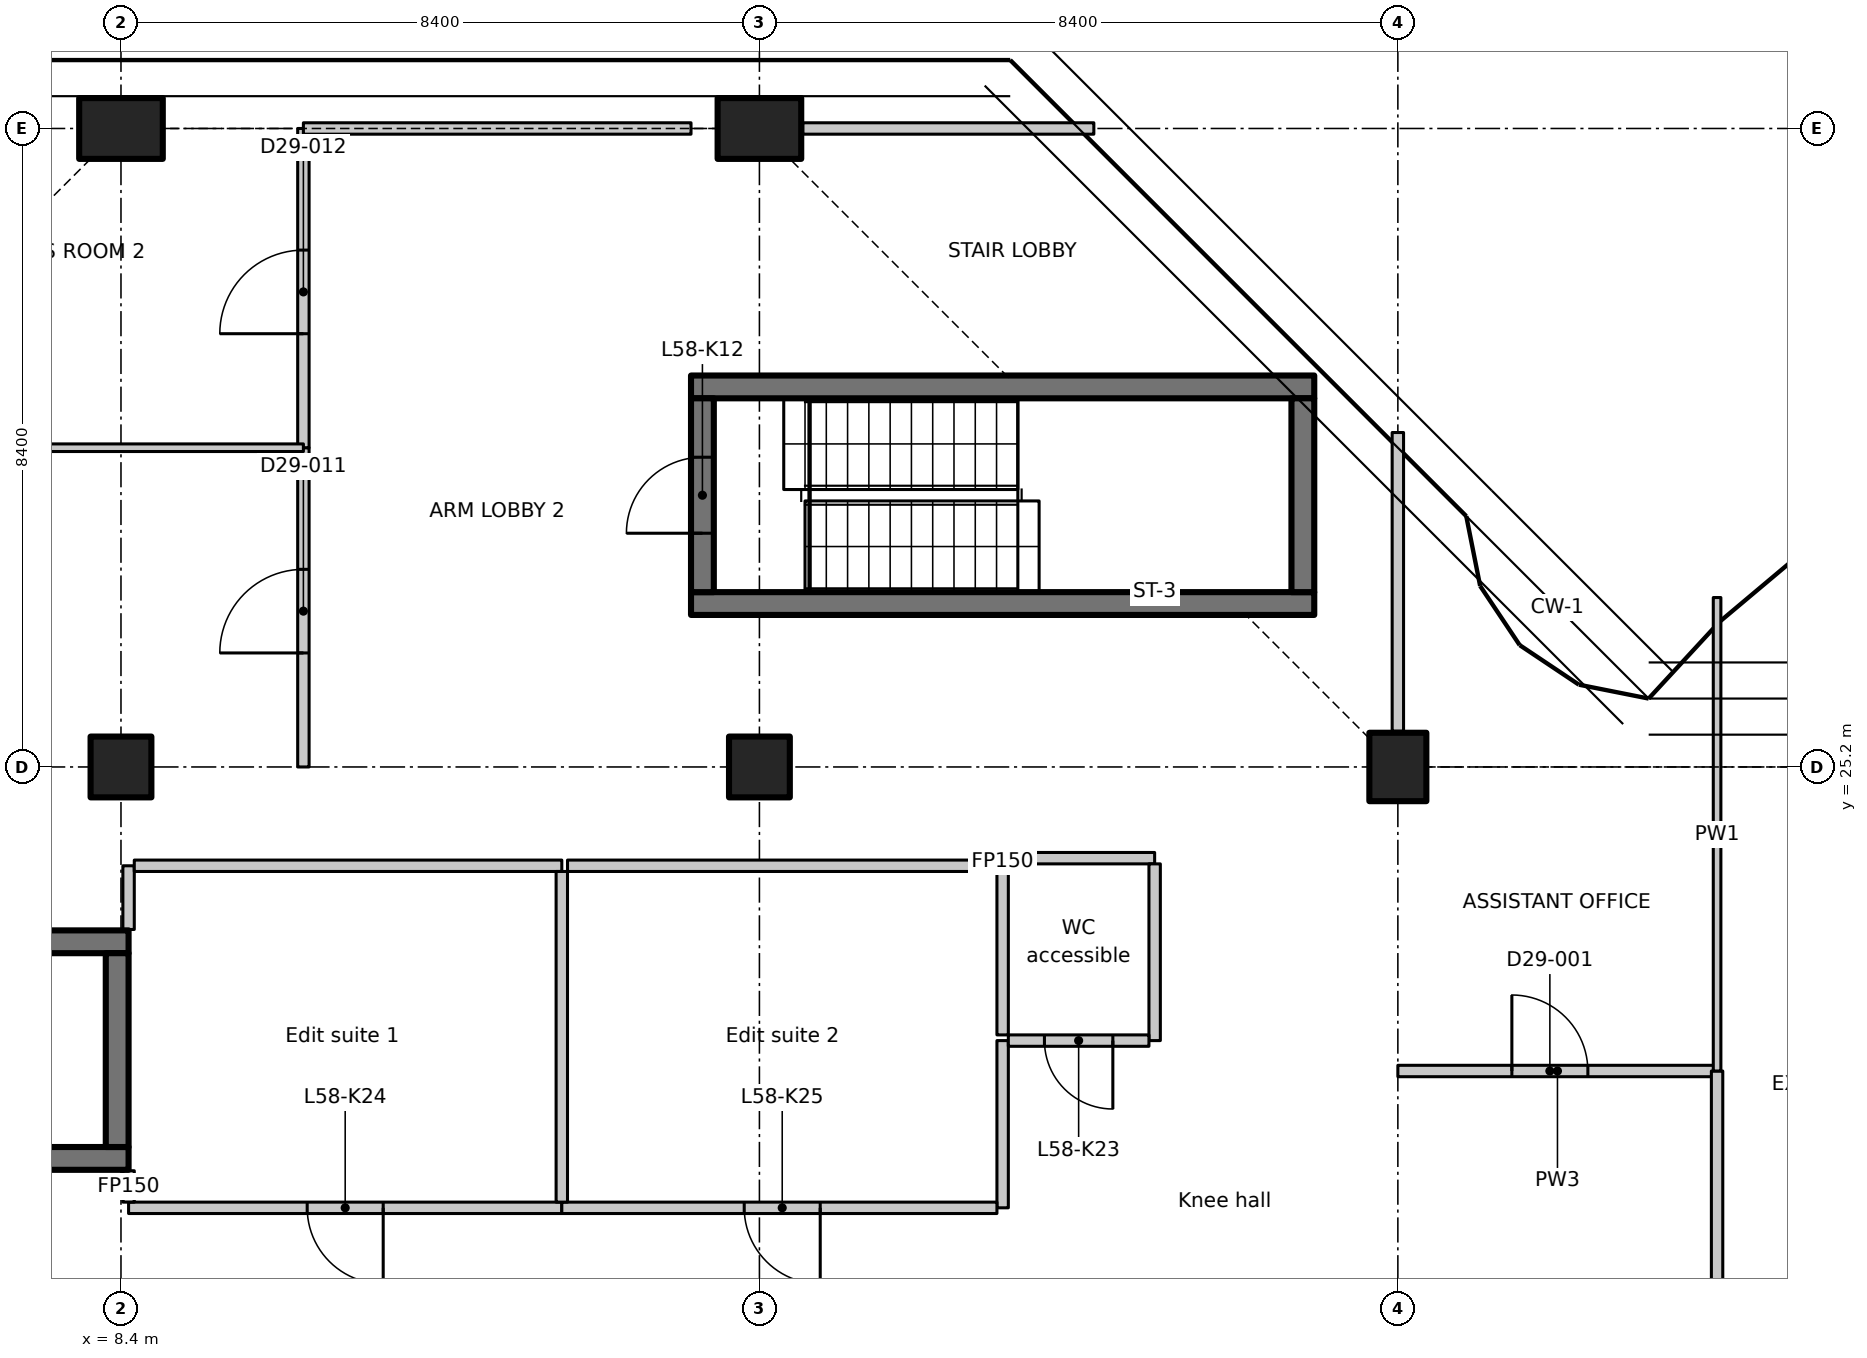
"""IFC4 building model, lengths in metres.
Left out: names, types, materials, properties, quantities, classifications, styles, units other than length and angle.
Written with IfcOpenShell. Run it as: python <this file> out.ifc"""

import sys

from ifc_helpers import new_model, si_unit, direction, frame, frame_2d, origin, origin_2d, place, context, subcontext, project, spatial, polyline, rectangle, outline, extrude, element, fill, save


model = new_model("IFC4")
c1 = context("Model", 3, precision=1e-05, world=origin(), true_north=direction((0.0, 1.0)))
c2 = subcontext(c1, "Body", "Model", "MODEL_VIEW")
j1 = project(units=[si_unit("LENGTHUNIT", "METRE"), si_unit("PLANEANGLEUNIT", "RADIAN")], contexts=[c1])
p1 = place(None, origin())
s1 = spatial("IfcSite", under=j1, at=p1, CompositionType="ELEMENT")
p2 = place(p1, origin())
s2 = spatial("IfcBuilding", under=s1, at=p2, CompositionType="ELEMENT")
p3 = place(p2, frame((0.0, 0.0, 230.1)))
s3 = spatial("IfcBuildingStorey", under=s2, at=p3, CompositionType="ELEMENT", Elevation=230.1)
p4 = place(p3, frame((8.4, 25.2, 0.0), z_axis=(0.0, 0.0, 1.0), x_axis=(1.0, 0.0, 0.0)))
e1 = element("IfcColumn", 1, at=p4, inside=s3, PredefinedType="COLUMN", context=c2, shape_type="SweptSolid", body=[
    extrude(rectangle(XDim=0.8, YDim=0.8, at=origin_2d()), origin(), (0.0, 0.0, 1.0), 3.35),
])
p5 = place(p3, frame((8.4, 33.6, 0.0), z_axis=(0.0, 0.0, 1.0), x_axis=(0.0, 1.0, 0.0)))
e2 = element("IfcColumn", 2, at=p5, inside=s3, PredefinedType="COLUMN", context=c2, shape_type="SweptSolid", body=[
    extrude(rectangle(XDim=0.8, YDim=1.1, at=origin_2d()), origin(), (0.0, 0.0, 1.0), 3.35),
])
p6 = place(p3, frame((16.8, 25.2, 0.0), z_axis=(0.0, 0.0, 1.0), x_axis=(1.0, 0.0, 0.0)))
e3 = element("IfcColumn", 3, at=p6, inside=s3, PredefinedType="COLUMN", context=c2, shape_type="SweptSolid", body=[
    extrude(rectangle(XDim=0.8, YDim=0.8, at=origin_2d()), origin(), (0.0, 0.0, 1.0), 3.35),
])
p7 = place(p3, frame((16.8, 33.6, 0.0), z_axis=(0.0, 0.0, 1.0), x_axis=(0.0, 1.0, 0.0)))
e4 = element("IfcColumn", 4, at=p7, inside=s3, PredefinedType="COLUMN", context=c2, shape_type="SweptSolid", body=[
    extrude(rectangle(XDim=0.8, YDim=1.1, at=origin_2d()), origin(), (0.0, 0.0, 1.0), 3.35),
])
p8 = place(p3, frame((25.2, 25.2, 0.0), z_axis=(0.0, 0.0, 1.0), x_axis=(1.0, 0.0, 0.0)))
e5 = element("IfcColumn", 5, at=p8, inside=s3, PredefinedType="COLUMN", context=c2, shape_type="SweptSolid", body=[
    extrude(rectangle(XDim=0.75, YDim=0.9, at=origin_2d()), origin(), (0.0, 0.0, 1.0), 3.35),
])
p9 = place(p3, frame((8.5, 20.05, 0.0), z_axis=(0.0, 0.0, 1.0), x_axis=(-1.0, 0.0, 0.0)))
e6 = element("IfcWall", 6, at=p9, inside=s3, PredefinedType="SHEAR", context=c2, shape_type="SweptSolid", body=[
    extrude(rectangle(XDim=8.2, YDim=0.3, at=frame_2d((4.1, 0.0))), origin(), (0.0, 0.0, 1.0), 3.35),
])
p10 = place(p9, frame((6.8, 0.0, 0.0)))
e7 = element("IfcOpeningElement", 7, at=p10, cuts=e6, PredefinedType="OPENING", context=c2, shape_type="SweptSolid", body=[
    extrude(rectangle(XDim=1.0, YDim=2.1, at=frame_2d((0.5, 1.05))), frame((0.0, 0.16, 0.0), z_axis=(0.0, -1.0, 0.0), x_axis=(1.0, 0.0, 0.0)), (0.0, 0.0, 1.0), 0.32),
])
p11 = place(p3, frame((0.3, 22.9, 0.0), z_axis=(0.0, 0.0, 1.0), x_axis=(1.0, 0.0, 0.0)))
e8 = element("IfcWall", 8, at=p11, inside=s3, PredefinedType="SHEAR", context=c2, shape_type="SweptSolid", body=[
    extrude(rectangle(XDim=8.2, YDim=0.3, at=frame_2d((4.1, 0.0))), origin(), (0.0, 0.0, 1.0), 3.35),
])
p12 = place(p11, frame((0.4, 0.0, 0.0)))
e9 = element("IfcOpeningElement", 9, at=p12, cuts=e8, PredefinedType="OPENING", context=c2, shape_type="SweptSolid", body=[
    extrude(rectangle(XDim=1.0, YDim=2.1, at=frame_2d((0.5, 1.05))), frame((0.0, 0.16, 0.0), z_axis=(0.0, -1.0, 0.0), x_axis=(1.0, 0.0, 0.0)), (0.0, 0.0, 1.0), 0.32),
])
p13 = place(p3, frame((8.35, 20.2, 0.0), z_axis=(0.0, 0.0, 1.0), x_axis=(0.0, 1.0, 0.0)))
e10 = element("IfcWall", 10, at=p13, inside=s3, PredefinedType="SHEAR", context=c2, shape_type="SweptSolid", body=[
    extrude(rectangle(XDim=2.55, YDim=0.3, at=frame_2d((1.275, 0.0))), origin(), (0.0, 0.0, 1.0), 3.35),
])
for number, where, z_axis, x_axis in (
    (11, (15.9, 27.35, 0.0), (0.0, 0.0, 1.0), (1.0, 0.0, 0.0)),
    (12, (15.9, 30.2, 0.0), (0.0, 0.0, 1.0), (1.0, 0.0, 0.0)),
):
    element("IfcWall", number, at=place(p3, frame(where, z_axis=z_axis, x_axis=x_axis)), inside=s3, PredefinedType="SHEAR", context=c2, shape_type="SweptSolid", body=[
        extrude(rectangle(XDim=8.2, YDim=0.3, at=frame_2d((4.1, 0.0))), origin(), (0.0, 0.0, 1.0), 3.35),
    ])
p14 = place(p3, frame((16.05, 27.5, 0.0), z_axis=(0.0, 0.0, 1.0), x_axis=(0.0, 1.0, 0.0)))
e13 = element("IfcWall", 13, at=p14, inside=s3, PredefinedType="SHEAR", context=c2, shape_type="SweptSolid", body=[
    extrude(rectangle(XDim=2.55, YDim=0.3, at=frame_2d((1.275, 0.0))), origin(), (0.0, 0.0, 1.0), 3.35),
])
p15 = place(p14, frame((0.775, 0.0, 0.0)))
e14 = element("IfcOpeningElement", 14, at=p15, cuts=e13, PredefinedType="OPENING", context=c2, shape_type="SweptSolid", body=[
    extrude(rectangle(XDim=1.0, YDim=2.1, at=frame_2d((0.5, 1.05))), frame((0.0, 0.16, 0.0), z_axis=(0.0, -1.0, 0.0), x_axis=(1.0, 0.0, 0.0)), (0.0, 0.0, 1.0), 0.32),
])
p16 = place(p3, frame((23.95, 27.5, 0.0), z_axis=(0.0, 0.0, 1.0), x_axis=(0.0, 1.0, 0.0)))
e15 = element("IfcWall", 15, at=p16, inside=s3, PredefinedType="SHEAR", context=c2, shape_type="SweptSolid", body=[
    extrude(rectangle(XDim=2.55, YDim=0.3, at=frame_2d((1.275, 0.0))), origin(), (0.0, 0.0, 1.0), 3.35),
])
p17 = place(p3, frame((14.2, 19.4, 0.0), z_axis=(0.0, 0.0, 1.0), x_axis=(-1.0, 0.0, 0.0)))
e16 = element("IfcWall", 16, at=p17, inside=s3, PredefinedType="PARTITIONING", context=c2, shape_type="SweptSolid", body=[
    extrude(rectangle(XDim=5.7, YDim=0.15, at=frame_2d((2.85, 0.0))), origin(), (0.0, 0.0, 1.0), 3.35),
])
p18 = place(p17, frame((2.35, 0.0, 0.0)))
e17 = element("IfcOpeningElement", 17, at=p18, cuts=e16, PredefinedType="OPENING", context=c2, shape_type="SweptSolid", body=[
    extrude(rectangle(XDim=1.0, YDim=2.1, at=frame_2d((0.5, 1.05))), frame((0.0, 0.085, 0.0), z_axis=(0.0, -1.0, 0.0), x_axis=(1.0, 0.0, 0.0)), (0.0, 0.0, 1.0), 0.17),
])
p19 = place(p3, frame((8.5, 19.475, 0.0), z_axis=(0.0, 0.0, 1.0), x_axis=(0.0, 1.0, 0.0)))
e18 = element("IfcWall", 18, at=p19, inside=s3, PredefinedType="PARTITIONING", context=c2, shape_type="SweptSolid", body=[
    extrude(rectangle(XDim=0.413, YDim=0.15, at=frame_2d((0.207, 0.0))), origin(), (0.0, 0.0, 1.0), 3.35),
])
p20 = place(p3, frame((8.5, 23.062, 0.0), z_axis=(0.0, 0.0, 1.0), x_axis=(0.0, 1.0, 0.0)))
e19 = element("IfcWall", 19, at=p20, inside=s3, PredefinedType="PARTITIONING", context=c2, shape_type="SweptSolid", body=[
    extrude(rectangle(XDim=0.838, YDim=0.15, at=frame_2d((0.419, 0.0))), origin(), (0.0, 0.0, 1.0), 3.35),
])
p21 = place(p3, frame((8.575, 23.9, 0.0), z_axis=(0.0, 0.0, 1.0), x_axis=(1.0, 0.0, 0.0)))
e20 = element("IfcWall", 20, at=p21, inside=s3, PredefinedType="PARTITIONING", context=c2, shape_type="SweptSolid", body=[
    extrude(rectangle(XDim=5.625, YDim=0.15, at=frame_2d((2.812, 0.0))), origin(), (0.0, 0.0, 1.0), 3.35),
])
p22 = place(p3, frame((20.0, 21.6, 0.0), z_axis=(0.0, 0.0, 1.0), x_axis=(0.0, -1.0, 0.0)))
e21 = element("IfcWall", 21, at=p22, inside=s3, PredefinedType="PARTITIONING", context=c2, shape_type="SweptSolid", body=[
    extrude(rectangle(XDim=2.2, YDim=0.15, at=frame_2d((1.1, 0.0))), origin(), (0.0, 0.0, 1.0), 3.35),
])
p23 = place(p3, frame((19.925, 19.4, 0.0), z_axis=(0.0, 0.0, 1.0), x_axis=(-1.0, 0.0, 0.0)))
e22 = element("IfcWall", 22, at=p23, inside=s3, PredefinedType="PARTITIONING", context=c2, shape_type="SweptSolid", body=[
    extrude(rectangle(XDim=5.725, YDim=0.15, at=frame_2d((2.863, 0.0))), origin(), (0.0, 0.0, 1.0), 3.35),
])
p24 = place(p23, frame((2.325, 0.0, 0.0)))
e23 = element("IfcOpeningElement", 23, at=p24, cuts=e22, PredefinedType="OPENING", context=c2, shape_type="SweptSolid", body=[
    extrude(rectangle(XDim=1.0, YDim=2.1, at=frame_2d((0.5, 1.05))), frame((0.0, 0.085, 0.0), z_axis=(0.0, -1.0, 0.0), x_axis=(1.0, 0.0, 0.0)), (0.0, 0.0, 1.0), 0.17),
])
p25 = place(p3, frame((14.2, 23.825, 0.0), z_axis=(0.0, 0.0, 1.0), x_axis=(0.0, -1.0, 0.0)))
e24 = element("IfcWall", 24, at=p25, inside=s3, PredefinedType="PARTITIONING", context=c2, shape_type="SweptSolid", body=[
    extrude(rectangle(XDim=4.35, YDim=0.15, at=frame_2d((2.175, 0.0))), origin(), (0.0, 0.0, 1.0), 3.35),
])
p26 = place(p3, frame((14.275, 23.9, 0.0), z_axis=(0.0, 0.0, 1.0), x_axis=(1.0, 0.0, 0.0)))
e25 = element("IfcWall", 25, at=p26, inside=s3, PredefinedType="PARTITIONING", context=c2, shape_type="SweptSolid", body=[
    extrude(rectangle(XDim=5.725, YDim=0.15, at=frame_2d((2.863, 0.0))), origin(), (0.0, 0.0, 1.0), 3.35),
])
p27 = place(p3, frame((20.0, 23.9, 0.0), z_axis=(0.0, 0.0, 1.0), x_axis=(0.0, 1.0, 0.0)))
e26 = element("IfcWall", 26, at=p27, inside=s3, PredefinedType="PARTITIONING", context=c2, shape_type="SweptSolid", body=[
    extrude(rectangle(XDim=0.1, YDim=0.15, at=frame_2d((0.05, 0.0))), origin(), (0.0, 0.0, 1.0), 3.35),
])
p28 = place(p3, frame((20.075, 24.0, 0.0), z_axis=(0.0, 0.0, 1.0), x_axis=(1.0, 0.0, 0.0)))
e27 = element("IfcWall", 27, at=p28, inside=s3, PredefinedType="PARTITIONING", context=c2, shape_type="SweptSolid", body=[
    extrude(rectangle(XDim=1.925, YDim=0.15, at=frame_2d((0.962, 0.0))), origin(), (0.0, 0.0, 1.0), 3.35),
])
p29 = place(p3, frame((22.0, 23.925, 0.0), z_axis=(0.0, 0.0, 1.0), x_axis=(0.0, -1.0, 0.0)))
e28 = element("IfcWall", 28, at=p29, inside=s3, PredefinedType="PARTITIONING", context=c2, shape_type="SweptSolid", body=[
    extrude(rectangle(XDim=2.325, YDim=0.15, at=frame_2d((1.163, 0.0))), origin(), (0.0, 0.0, 1.0), 3.35),
])
p30 = place(p3, frame((21.925, 21.6, 0.0), z_axis=(0.0, 0.0, 1.0), x_axis=(-1.0, 0.0, 0.0)))
e29 = element("IfcWall", 29, at=p30, inside=s3, PredefinedType="PARTITIONING", context=c2, shape_type="SweptSolid", body=[
    extrude(rectangle(XDim=1.85, YDim=0.15, at=frame_2d((0.925, 0.0))), origin(), (0.0, 0.0, 1.0), 3.35),
])
p31 = place(p30, frame((0.475, 0.0, 0.0)))
e30 = element("IfcOpeningElement", 30, at=p31, cuts=e29, PredefinedType="OPENING", context=c2, shape_type="SweptSolid", body=[
    extrude(rectangle(XDim=0.9, YDim=2.1, at=frame_2d((0.45, 1.05))), frame((0.0, 0.085, 0.0), z_axis=(0.0, -1.0, 0.0), x_axis=(1.0, 0.0, 0.0)), (0.0, 0.0, 1.0), 0.17),
])
p32 = place(p3, frame((20.0, 21.675, 0.0), z_axis=(0.0, 0.0, 1.0), x_axis=(0.0, 1.0, 0.0)))
e31 = element("IfcWall", 31, at=p32, inside=s3, PredefinedType="PARTITIONING", context=c2, shape_type="SweptSolid", body=[
    extrude(rectangle(XDim=2.15, YDim=0.15, at=frame_2d((1.075, 0.0))), origin(), (0.0, 0.0, 1.0), 3.35),
])
p33 = place(p3, frame((25.2, 21.2, 0.0), z_axis=(0.0, 0.0, 1.0), x_axis=(1.0, 0.0, 0.0)))
e32 = element("IfcWall", 32, at=p33, inside=s3, PredefinedType="PARTITIONING", context=c2, shape_type="SweptSolid", body=[
    extrude(rectangle(XDim=4.2, YDim=0.15, at=frame_2d((2.1, 0.0))), origin(), (0.0, 0.0, 1.0), 3.33),
])
p34 = place(p33, frame((1.5, 0.0, 0.0)))
e33 = element("IfcOpeningElement", 33, at=p34, cuts=e32, PredefinedType="OPENING", context=c2, shape_type="SweptSolid", body=[
    extrude(rectangle(XDim=1.0, YDim=2.1, at=frame_2d((0.5, 1.05))), frame((0.0, 0.085, 0.0), z_axis=(0.0, -1.0, 0.0), x_axis=(1.0, 0.0, 0.0)), (0.0, 0.0, 1.0), 0.17),
])
p35 = place(p3, frame((29.4, 21.2, 0.0), z_axis=(0.0, 0.0, 1.0), x_axis=(0.0, -1.0, 0.0)))
e34 = element("IfcWall", 34, at=p35, inside=s3, PredefinedType="PARTITIONING", context=c2, shape_type="SweptSolid", body=[
    extrude(rectangle(XDim=8.2, YDim=0.15, at=frame_2d((4.1, 0.0))), origin(), (0.0, 0.0, 1.0), 3.33),
])
p36 = place(p35, frame((3.3, 0.0, 0.0)))
e35 = element("IfcOpeningElement", 35, at=p36, cuts=e34, PredefinedType="OPENING", context=c2, shape_type="SweptSolid", body=[
    extrude(rectangle(XDim=1.6, YDim=2.1, at=frame_2d((0.8, 1.05))), frame((0.0, 0.085, 0.0), z_axis=(0.0, -1.0, 0.0), x_axis=(1.0, 0.0, 0.0)), (0.0, 0.0, 1.0), 0.17),
])
p37 = place(p3, frame((29.4, 27.429, 0.0), z_axis=(0.0, 0.0, 1.0), x_axis=(0.0, -1.0, 0.0)))
e36 = element("IfcWall", 36, at=p37, inside=s3, PredefinedType="PARTITIONING", context=c2, shape_type="SweptSolid", body=[
    extrude(outline(polyline([(0.0, 0.0), (6.229, 0.0), (6.229, 3.33), (2.679, 3.33), (2.677, 2.98), (1.781, 2.98), (1.779, 3.33), (0.154, 3.33), (0.0, 3.33), (0.0, 0.0)])), frame((0.0, 0.05, 0.0), z_axis=(0.0, -1.0, 0.0), x_axis=(1.0, 0.0, 0.0)), (0.0, 0.0, 1.0), 0.1),
])
p38 = place(p3, frame((25.2, 25.67, 0.0), z_axis=(0.0, 0.0, 1.0), x_axis=(0.0, 1.0, 0.0)))
e37 = element("IfcWall", 37, at=p38, inside=s3, PredefinedType="PARTITIONING", context=c2, shape_type="SweptSolid", body=[
    extrude(rectangle(XDim=3.93, YDim=0.15, at=frame_2d((1.965, 0.0))), origin(), (0.0, 0.0, 1.0), 2.98),
])
p39 = place(p3, frame((10.8, 25.2, 0.0), z_axis=(0.0, 0.0, 1.0), x_axis=(0.0, 1.0, 0.0)))
e38 = element("IfcWall", 38, at=p39, inside=s3, PredefinedType="PARTITIONING", context=c2, shape_type="SweptSolid", body=[
    extrude(rectangle(XDim=4.2, YDim=0.15, at=frame_2d((2.1, 0.0))), origin(), (0.0, 0.0, 1.0), 3.33),
])
p40 = place(p39, frame((1.5, 0.0, 0.0)))
e39 = element("IfcOpeningElement", 39, at=p40, cuts=e38, PredefinedType="OPENING", context=c2, shape_type="SweptSolid", body=[
    extrude(rectangle(XDim=1.1, YDim=2.1, at=frame_2d((0.55, 1.05))), frame((0.0, 0.085, 0.0), z_axis=(0.0, -1.0, 0.0), x_axis=(1.0, 0.0, 0.0)), (0.0, 0.0, 1.0), 0.17),
])
p41 = place(p3, frame((10.8, 29.4, 0.0), z_axis=(0.0, 0.0, 1.0), x_axis=(0.0, 1.0, 0.0)))
e40 = element("IfcWall", 40, at=p41, inside=s3, PredefinedType="PARTITIONING", context=c2, shape_type="SweptSolid", body=[
    extrude(rectangle(XDim=4.2, YDim=0.15, at=frame_2d((2.1, 0.0))), origin(), (0.0, 0.0, 1.0), 2.98),
])
p42 = place(p41, frame((1.5, 0.0, 0.0)))
e41 = element("IfcOpeningElement", 41, at=p42, cuts=e40, PredefinedType="OPENING", context=c2, shape_type="SweptSolid", body=[
    extrude(rectangle(XDim=1.1, YDim=2.1, at=frame_2d((0.55, 1.05))), frame((0.0, 0.085, 0.0), z_axis=(0.0, -1.0, 0.0), x_axis=(1.0, 0.0, 0.0)), (0.0, 0.0, 1.0), 0.17),
])
p43 = place(p3, frame((10.8, 33.6, 0.0), z_axis=(0.0, 0.0, 1.0), x_axis=(1.0, 0.0, 0.0)))
e42 = element("IfcWall", 42, at=p43, inside=s3, PredefinedType="PARTITIONING", context=c2, shape_type="SweptSolid", body=[
    extrude(outline(polyline([(0.0, 0.0), (5.1, 0.0), (5.1, 2.98), (0.0, 2.98), (0.0, 0.0)])), frame((0.0, 0.075, 0.0), z_axis=(0.0, -1.0, 0.0), x_axis=(1.0, 0.0, 0.0)), (0.0, 0.0, 1.0), 0.15),
])
p44 = place(p3, frame((17.37, 33.6, 0.0), z_axis=(0.0, 0.0, 1.0), x_axis=(1.0, 0.0, 0.0)))
e43 = element("IfcWall", 43, at=p44, inside=s3, PredefinedType="PARTITIONING", context=c2, shape_type="SweptSolid", body=[
    extrude(rectangle(XDim=3.83, YDim=0.15, at=frame_2d((1.915, 0.0))), origin(), (0.0, 0.0, 1.0), 2.98),
])
p45 = place(p3, frame((-0.302, 29.4, 0.0), z_axis=(0.0, 0.0, 1.0), x_axis=(1.0, 0.0, 0.0)))
e44 = element("IfcWall", 44, at=p45, inside=s3, PredefinedType="PARTITIONING", context=c2, shape_type="SweptSolid", body=[
    extrude(outline(polyline([(0.0, 0.0), (11.103, 0.0), (11.103, 3.33), (5.168, 3.33), (5.166, 2.98), (3.839, 2.98), (3.837, 3.33), (0.103, 3.33), (0.0, 3.33), (0.0, 0.0)])), frame((0.0, 0.05, 0.0), z_axis=(0.0, -1.0, 0.0), x_axis=(1.0, 0.0, 0.0)), (0.0, 0.0, 1.0), 0.1),
])
p46 = place(p15, origin())
e45 = element("IfcDoor", 45, at=p46, inside=s3, OperationType="SINGLE_SWING_LEFT", PredefinedType="DOOR", context=c2, shape_type="SweptSolid", body=[
    extrude(rectangle(XDim=1.0, YDim=2.1, at=frame_2d((0.5, 1.05))), frame((0.0, 0.025, 0.0), z_axis=(0.0, -1.0, 0.0), x_axis=(1.0, 0.0, 0.0)), (0.0, 0.0, 1.0), 0.05),
])
fill(e14, e45)
p47 = place(p31, origin())
e46 = element("IfcDoor", 46, at=p47, inside=s3, OperationType="SINGLE_SWING_RIGHT", PredefinedType="DOOR", context=c2, shape_type="SweptSolid", body=[
    extrude(rectangle(XDim=0.9, YDim=2.1, at=frame_2d((0.45, 1.05))), frame((0.0, 0.025, 0.0), z_axis=(0.0, -1.0, 0.0), x_axis=(1.0, 0.0, 0.0)), (0.0, 0.0, 1.0), 0.05),
])
fill(e30, e46)
p48 = place(p18, origin())
e47 = element("IfcDoor", 47, at=p48, inside=s3, OperationType="SINGLE_SWING_LEFT", PredefinedType="DOOR", context=c2, shape_type="SweptSolid", body=[
    extrude(rectangle(XDim=1.0, YDim=2.1, at=frame_2d((0.5, 1.05))), frame((0.0, 0.025, 0.0), z_axis=(0.0, -1.0, 0.0), x_axis=(1.0, 0.0, 0.0)), (0.0, 0.0, 1.0), 0.05),
])
fill(e17, e47)
p49 = place(p24, origin())
e48 = element("IfcDoor", 48, at=p49, inside=s3, OperationType="SINGLE_SWING_RIGHT", PredefinedType="DOOR", context=c2, shape_type="SweptSolid", body=[
    extrude(rectangle(XDim=1.0, YDim=2.1, at=frame_2d((0.5, 1.05))), frame((0.0, 0.025, 0.0), z_axis=(0.0, -1.0, 0.0), x_axis=(1.0, 0.0, 0.0)), (0.0, 0.0, 1.0), 0.05),
])
fill(e23, e48)
p50 = place(p34, origin())
e49 = element("IfcDoor", 49, at=p50, inside=s3, OperationType="SINGLE_SWING_LEFT", PredefinedType="DOOR", context=c2, shape_type="SweptSolid", body=[
    extrude(rectangle(XDim=1.0, YDim=2.1, at=frame_2d((0.5, 1.05))), frame((0.0, 0.025, 0.0), z_axis=(0.0, -1.0, 0.0), x_axis=(1.0, 0.0, 0.0)), (0.0, 0.0, 1.0), 0.05),
])
fill(e33, e49)
p51 = place(p40, origin())
e50 = element("IfcDoor", 50, at=p51, inside=s3, OperationType="SINGLE_SWING_LEFT", PredefinedType="DOOR", context=c2, shape_type="SweptSolid", body=[
    extrude(rectangle(XDim=1.1, YDim=2.1, at=frame_2d((0.55, 1.05))), frame((0.0, 0.025, 0.0), z_axis=(0.0, -1.0, 0.0), x_axis=(1.0, 0.0, 0.0)), (0.0, 0.0, 1.0), 0.05),
])
fill(e39, e50)
p52 = place(p42, origin())
e51 = element("IfcDoor", 51, at=p52, inside=s3, OperationType="SINGLE_SWING_LEFT", PredefinedType="DOOR", context=c2, shape_type="SweptSolid", body=[
    extrude(rectangle(XDim=1.1, YDim=2.1, at=frame_2d((0.55, 1.05))), frame((0.0, 0.025, 0.0), z_axis=(0.0, -1.0, 0.0), x_axis=(1.0, 0.0, 0.0)), (0.0, 0.0, 1.0), 0.05),
])
fill(e41, e51)
save(model, sys.argv[1])
